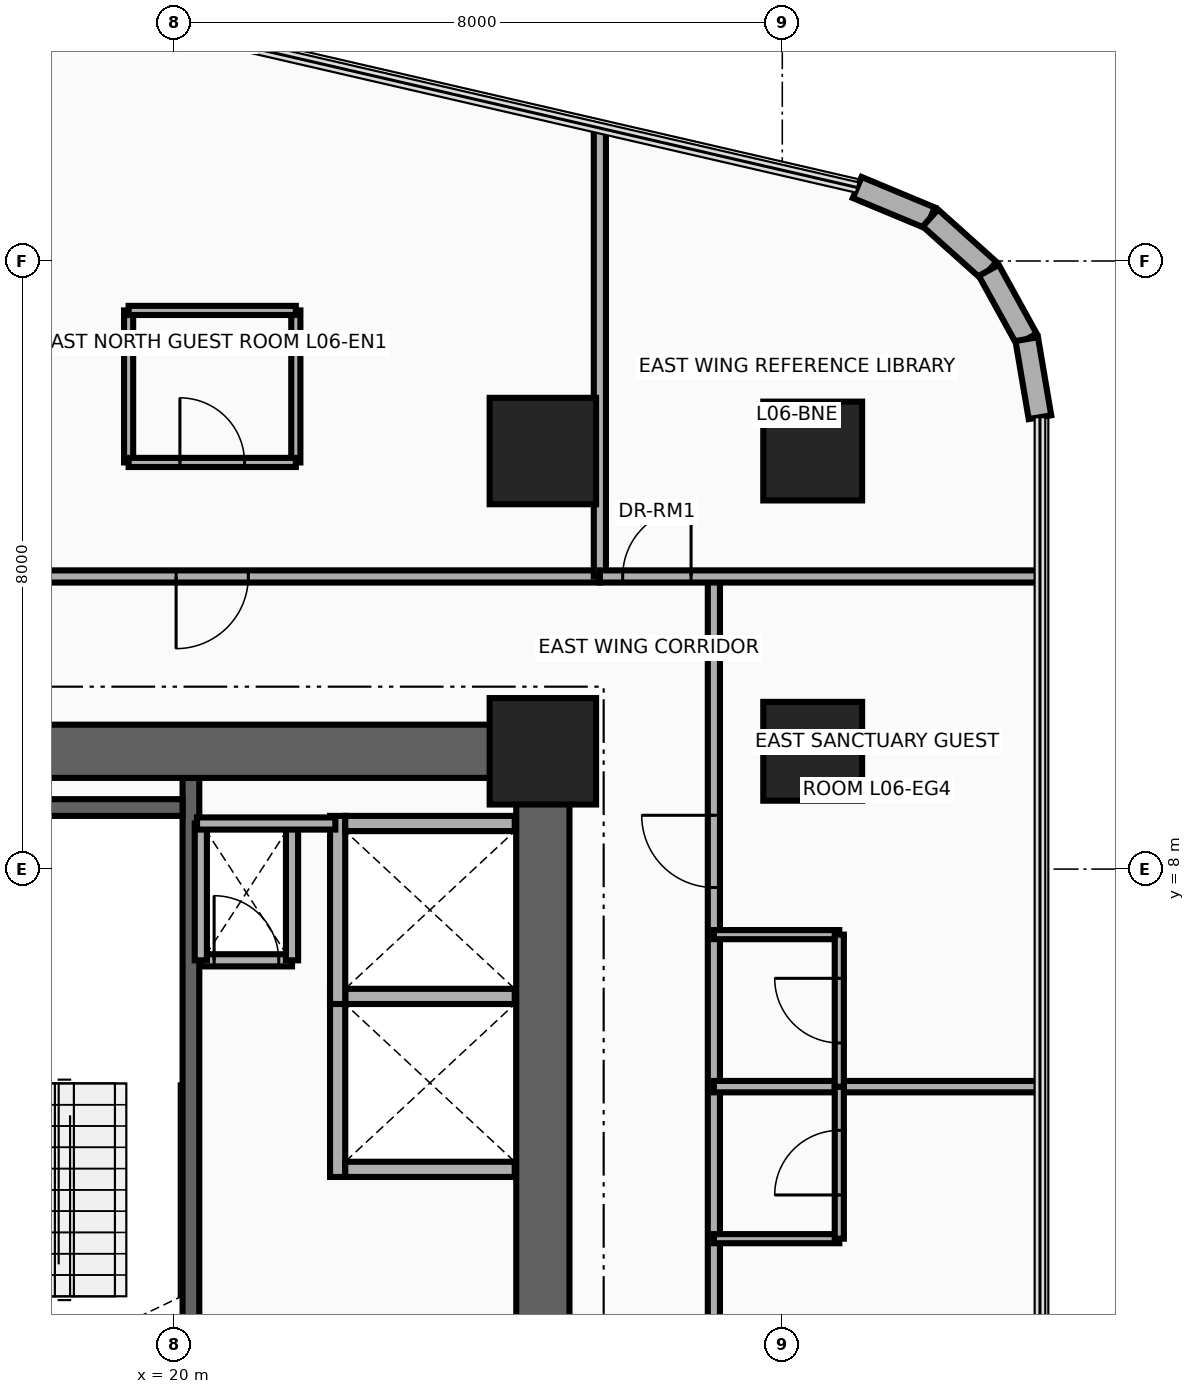
"""IFC4 building model, lengths in metres.
Left out: names, types, materials, properties, quantities, classifications, styles, units other than length and angle.
Written with IfcOpenShell. Run it as: python <this file> out.ifc"""

import sys

from ifc_helpers import new_model, si_unit, direction, frame, frame_2d, origin, origin_2d, place, context, subcontext, project, spatial, rectangle, circle, extrude, source, transform, mapped, element, fill, save


model = new_model("IFC4")
c1 = context("Model", 3, precision=1e-05, world=origin(), true_north=direction((0.0, 1.0)))
c2 = subcontext(c1, "Body", "Model", "MODEL_VIEW")
j1 = project(units=[si_unit("LENGTHUNIT", "METRE"), si_unit("PLANEANGLEUNIT", "RADIAN")], contexts=[c1])
p1 = place(None, origin())
s1 = spatial("IfcSite", under=j1, at=p1, CompositionType="ELEMENT")
p2 = place(p1, origin())
s2 = spatial("IfcBuilding", under=s1, at=p2, CompositionType="ELEMENT")
p3 = place(p2, frame((0.0, 0.0, 29.7)))
s3 = spatial("IfcBuildingStorey", under=s2, at=p3, CompositionType="ELEMENT", Elevation=29.7)
p4 = place(p3, frame((20.22, 0.68, 0.0), z_axis=(0.0, 0.0, 1.0), x_axis=(0.0, 1.0, 0.0)))
e1 = element("IfcWall", 1, at=p4, inside=s3, PredefinedType="SHEAR", context=c2, shape_type="SweptSolid", body=[
    extrude(rectangle(XDim=8.52, YDim=0.22, at=frame_2d((4.26, 0.0))), origin(), (0.0, 0.0, 1.0), 3.46),
])
p5 = place(p3, frame((17.0, 8.81, 0.0), z_axis=(0.0, 0.0, 1.0), x_axis=(1.0, 0.0, 0.0)))
e2 = element("IfcWall", 2, at=p5, inside=s3, PredefinedType="SHEAR", context=c2, shape_type="SweptSolid", body=[
    extrude(rectangle(XDim=3.11, YDim=0.22, at=frame_2d((1.555, 0.0))), origin(), (0.0, 0.0, 1.0), 3.46),
])
p6 = place(p3, frame((24.85, 0.95, 0.0), z_axis=(0.0, 0.0, 1.0), x_axis=(0.0, 1.0, 0.0)))
e3 = element("IfcWall", 3, at=p6, inside=s3, PredefinedType="SHEAR", context=c2, shape_type="SweptSolid", body=[
    extrude(rectangle(XDim=8.95, YDim=0.7, at=frame_2d((4.475, 0.0))), origin(), (0.0, 0.0, 1.0), 3.46),
])
p7 = place(p3, frame((15.85, 9.55, 0.0), z_axis=(0.0, 0.0, 1.0), x_axis=(1.0, 0.0, 0.0)))
e4 = element("IfcWall", 4, at=p7, inside=s3, PredefinedType="SHEAR", context=c2, shape_type="SweptSolid", body=[
    extrude(rectangle(XDim=9.0, YDim=0.7, at=frame_2d((4.5, 0.0))), origin(), (0.0, 0.0, 1.0), 3.46),
])
m1 = source(origin(), c2, "Body", "SweptSolid", [
    extrude(rectangle(XDim=1.4, YDim=1.4, at=origin_2d()), origin(), (0.0, 0.0, 1.0), 3.7),
])
p8 = place(p3, frame((24.85, 9.55, 0.0), z_axis=(0.0, 0.0, 1.0), x_axis=(1.0, 0.0, 0.0)))
e5 = element("IfcColumn", 5, at=p8, inside=s3, PredefinedType="COLUMN", context=c2, shape_type="MappedRepresentation", body=[
    mapped(m1, transform((0.0, 0.0, 0.0), x_axis=(1.0, 0.0, 0.0), y_axis=(0.0, 1.0, 0.0), z_axis=(0.0, 0.0, 1.0), scale=1.0)),
])
m2 = source(origin(), c2, "Body", "SweptSolid", [
    extrude(circle(Radius=0.65, at=origin_2d()), origin(), (0.0, 0.0, 1.0), 3.7),
])
p9 = place(p3, frame((28.4, 9.55, 0.0), z_axis=(0.0, 0.0, 1.0), x_axis=(1.0, 0.0, 0.0)))
e6 = element("IfcColumn", 6, at=p9, inside=s3, PredefinedType="COLUMN", context=c2, shape_type="MappedRepresentation", body=[
    mapped(m2, transform((0.0, 0.0, 0.0), x_axis=(1.0, 0.0, 0.0), y_axis=(0.0, 1.0, 0.0), z_axis=(0.0, 0.0, 1.0), scale=1.0)),
])
p10 = place(p3, frame((24.85, 13.5, 0.0), z_axis=(0.0, 0.0, 1.0), x_axis=(1.0, 0.0, 0.0)))
e7 = element("IfcColumn", 7, at=p10, inside=s3, PredefinedType="COLUMN", context=c2, shape_type="MappedRepresentation", body=[
    mapped(m1, transform((0.0, 0.0, 0.0), x_axis=(1.0, 0.0, 0.0), y_axis=(0.0, 1.0, 0.0), z_axis=(0.0, 0.0, 1.0), scale=1.0)),
])
p11 = place(p3, frame((28.4, 13.5, 0.0), z_axis=(0.0, 0.0, 1.0), x_axis=(1.0, 0.0, 0.0)))
e8 = element("IfcColumn", 8, at=p11, inside=s3, PredefinedType="COLUMN", context=c2, shape_type="MappedRepresentation", body=[
    mapped(m2, transform((0.0, 0.0, 0.0), x_axis=(1.0, 0.0, 0.0), y_axis=(0.0, 1.0, 0.0), z_axis=(0.0, 0.0, 1.0), scale=1.0)),
])
p12 = place(p3, frame((28.986, 16.967, 0.0), z_axis=(0.0, 0.0, 1.0), x_axis=(0.923083852684, -0.384598753136, 0.0)))
e9 = element("IfcWall", 9, at=p12, inside=s3, PredefinedType="SOLIDWALL", context=c2, shape_type="SweptSolid", body=[
    extrude(rectangle(XDim=1.042, YDim=0.3, at=frame_2d((0.521, 0.0))), origin(), (0.0, 0.0, 1.0), 3.46),
])
p13 = place(p3, frame((29.948, 16.566, 0.0), z_axis=(0.0, 0.0, 1.0), x_axis=(0.744585645533, -0.66752694063, 0.0)))
e10 = element("IfcWall", 10, at=p13, inside=s3, PredefinedType="SOLIDWALL", context=c2, shape_type="SweptSolid", body=[
    extrude(rectangle(XDim=1.033, YDim=0.3, at=frame_2d((0.517, 0.0))), origin(), (0.0, 0.0, 1.0), 3.46),
])
p14 = place(p3, frame((30.717, 15.877, 0.0), z_axis=(0.0, 0.0, 1.0), x_axis=(0.482971098131, -0.875636293429, 0.0)))
e11 = element("IfcWall", 11, at=p14, inside=s3, PredefinedType="SOLIDWALL", context=c2, shape_type="SweptSolid", body=[
    extrude(rectangle(XDim=1.033, YDim=0.3, at=frame_2d((0.516, 0.0))), origin(), (0.0, 0.0, 1.0), 3.46),
])
p15 = place(p3, frame((31.216, 14.973, 0.0), z_axis=(0.0, 0.0, 1.0), x_axis=(0.167019462117, -0.985953598946, 0.0)))
e12 = element("IfcWall", 12, at=p15, inside=s3, PredefinedType="SOLIDWALL", context=c2, shape_type="SweptSolid", body=[
    extrude(rectangle(XDim=1.042, YDim=0.3, at=frame_2d((0.521, 0.0))), origin(), (0.0, 0.0, 1.0), 3.46),
])
p16 = place(p3, frame((22.15, 3.95, 0.0), z_axis=(0.0, 0.0, 1.0), x_axis=(0.0, 1.0, 0.0)))
e13 = element("IfcWall", 13, at=p16, inside=s3, PredefinedType="MOVABLE", context=c2, shape_type="SweptSolid", body=[
    extrude(rectangle(XDim=2.475, YDim=0.2, at=frame_2d((1.238, 0.0))), origin(), (0.0, 0.0, 1.0), 3.46),
])
for number, where, z_axis, x_axis in (
    (14, (22.25, 4.05, 0.0), (0.0, 0.0, 1.0), (1.0, 0.0, 0.0)),
    (15, (22.25, 6.325, 0.0), (0.0, 0.0, 1.0), (1.0, 0.0, 0.0)),
):
    element("IfcWall", number, at=place(p3, frame(where, z_axis=z_axis, x_axis=x_axis)), inside=s3, PredefinedType="MOVABLE", context=c2, shape_type="SweptSolid", body=[
        extrude(rectangle(XDim=2.23, YDim=0.2, at=frame_2d((1.115, 0.0))), origin(), (0.0, 0.0, 1.0), 2.245),
    ])
p17 = place(p3, frame((22.15, 6.225, 0.0), z_axis=(0.0, 0.0, 1.0), x_axis=(0.0, 1.0, 0.0)))
e16 = element("IfcWall", 16, at=p17, inside=s3, PredefinedType="MOVABLE", context=c2, shape_type="SweptSolid", body=[
    extrude(rectangle(XDim=2.475, YDim=0.2, at=frame_2d((1.237, 0.0))), origin(), (0.0, 0.0, 1.0), 3.46),
])
p18 = place(p3, frame((22.25, 8.6, 0.0), z_axis=(0.0, 0.0, 1.0), x_axis=(1.0, 0.0, 0.0)))
e17 = element("IfcWall", 17, at=p18, inside=s3, PredefinedType="MOVABLE", context=c2, shape_type="SweptSolid", body=[
    extrude(rectangle(XDim=2.23, YDim=0.2, at=frame_2d((1.115, 0.0))), origin(), (0.0, 0.0, 1.0), 2.245),
])
p19 = place(p3, frame((20.35, 6.8, 0.0), z_axis=(0.0, 0.0, 1.0), x_axis=(1.0, 0.0, 0.0)))
e18 = element("IfcWall", 18, at=p19, inside=s3, PredefinedType="PARTITIONING", context=c2, shape_type="SweptSolid", body=[
    extrude(rectangle(XDim=1.2, YDim=0.16, at=frame_2d((0.6, 0.0))), origin(), (0.0, 0.0, 1.0), 3.46),
])
p20 = place(p19, frame((0.175, 0.0, 0.0)))
e19 = element("IfcOpeningElement", 19, at=p20, cuts=e18, PredefinedType="OPENING", context=c2, shape_type="SweptSolid", body=[
    extrude(rectangle(XDim=0.85, YDim=2.05, at=frame_2d((0.425, 1.025))), frame((0.0, 0.095, 0.0), z_axis=(0.0, -1.0, 0.0), x_axis=(1.0, 0.0, 0.0)), (0.0, 0.0, 1.0), 0.19),
])
for number, where, z_axis, x_axis in (
    (20, (21.55, 6.8, 0.0), (0.0, 0.0, 1.0), (0.0, 1.0, 0.0)),
    (21, (20.35, 6.8, 0.0), (0.0, 0.0, 1.0), (0.0, 1.0, 0.0)),
):
    element("IfcWall", number, at=place(p3, frame(where, z_axis=z_axis, x_axis=x_axis)), inside=s3, PredefinedType="PARTITIONING", context=c2, shape_type="SweptSolid", body=[
        extrude(rectangle(XDim=1.8, YDim=0.16, at=frame_2d((0.9, 0.0))), origin(), (0.0, 0.0, 1.0), 3.46),
    ])
p21 = place(p3, frame((20.3, 8.6, 0.0), z_axis=(0.0, 0.0, 1.0), x_axis=(1.0, 0.0, 0.0)))
e22 = element("IfcWall", 22, at=p21, inside=s3, PredefinedType="PARTITIONING", context=c2, shape_type="SweptSolid", body=[
    extrude(rectangle(XDim=1.82, YDim=0.16, at=frame_2d((0.91, 0.0))), origin(), (0.0, 0.0, 1.0), 3.46),
])
p22 = place(p3, frame((15.4, 11.85, 0.0), z_axis=(0.0, 0.0, 1.0), x_axis=(1.0, 0.0, 0.0)))
e23 = element("IfcWall", 23, at=p22, inside=s3, PredefinedType="PARTITIONING", context=c2, shape_type="SweptSolid", body=[
    extrude(rectangle(XDim=10.2, YDim=0.16, at=frame_2d((5.1, 0.0))), origin(), (0.0, 0.0, 1.0), 2.834),
])
p23 = place(p22, frame((4.625, 0.0, 0.0)))
e24 = element("IfcOpeningElement", 24, at=p23, cuts=e23, PredefinedType="OPENING", context=c2, shape_type="SweptSolid", body=[
    extrude(rectangle(XDim=0.95, YDim=2.15, at=frame_2d((0.475, 1.075))), frame((0.0, 0.095, 0.0), z_axis=(0.0, -1.0, 0.0), x_axis=(1.0, 0.0, 0.0)), (0.0, 0.0, 1.0), 0.19),
])
p24 = place(p3, frame((25.6, 11.85, 0.0), z_axis=(0.0, 0.0, 1.0), x_axis=(0.0, 1.0, 0.0)))
e25 = element("IfcWall", 25, at=p24, inside=s3, PredefinedType="PARTITIONING", context=c2, shape_type="SweptSolid", body=[
    extrude(rectangle(XDim=5.898, YDim=0.16, at=frame_2d((2.949, 0.0))), origin(), (0.0, 0.0, 1.0), 2.583),
])
for number, where, z_axis, x_axis in (
    (26, (19.4, 13.35, 0.0), (0.0, 0.0, 1.0), (0.0, 1.0, 0.0)),
    (27, (21.6, 13.35, 0.0), (0.0, 0.0, 1.0), (0.0, 1.0, 0.0)),
):
    element("IfcWall", number, at=place(p3, frame(where, z_axis=z_axis, x_axis=x_axis)), inside=s3, PredefinedType="PARTITIONING", context=c2, shape_type="SweptSolid", body=[
        extrude(rectangle(XDim=2.0, YDim=0.12, at=frame_2d((1.0, 0.0))), origin(), (0.0, 0.0, 1.0), 2.583),
    ])
p25 = place(p3, frame((19.4, 15.35, 0.0), z_axis=(0.0, 0.0, 1.0), x_axis=(1.0, 0.0, 0.0)))
e28 = element("IfcWall", 28, at=p25, inside=s3, PredefinedType="PARTITIONING", context=c2, shape_type="SweptSolid", body=[
    extrude(rectangle(XDim=2.2, YDim=0.12, at=frame_2d((1.1, 0.0))), origin(), (0.0, 0.0, 1.0), 3.46),
])
p26 = place(p3, frame((19.4, 13.35, 0.0), z_axis=(0.0, 0.0, 1.0), x_axis=(1.0, 0.0, 0.0)))
e29 = element("IfcWall", 29, at=p26, inside=s3, PredefinedType="PARTITIONING", context=c2, shape_type="SweptSolid", body=[
    extrude(rectangle(XDim=2.2, YDim=0.12, at=frame_2d((1.1, 0.0))), origin(), (0.0, 0.0, 1.0), 2.583),
])
p27 = place(p26, frame((0.675, 0.0, 0.0)))
e30 = element("IfcOpeningElement", 30, at=p27, cuts=e29, PredefinedType="OPENING", context=c2, shape_type="SweptSolid", body=[
    extrude(rectangle(XDim=0.85, YDim=2.1, at=frame_2d((0.425, 1.05))), frame((0.0, 0.075, 0.0), z_axis=(0.0, -1.0, 0.0), x_axis=(1.0, 0.0, 0.0)), (0.0, 0.0, 1.0), 0.15),
])
p28 = place(p3, frame((27.1, -13.89, 0.0), z_axis=(0.0, 0.0, 1.0), x_axis=(0.0, 1.0, 0.0)))
e31 = element("IfcWall", 31, at=p28, inside=s3, PredefinedType="PARTITIONING", context=c2, shape_type="SweptSolid", body=[
    extrude(rectangle(XDim=25.74, YDim=0.16, at=frame_2d((12.87, 0.0))), origin(), (0.0, 0.0, 1.0), 2.583),
])
p29 = place(p28, frame((2.62, 0.0, 0.0)))
e32 = element("IfcOpeningElement", 32, at=p29, cuts=e31, PredefinedType="OPENING", context=c2, shape_type="SweptSolid", body=[
    extrude(rectangle(XDim=0.95, YDim=2.15, at=frame_2d((0.475, 1.075))), frame((0.0, 0.095, 0.0), z_axis=(0.0, -1.0, 0.0), x_axis=(1.0, 0.0, 0.0)), (0.0, 0.0, 1.0), 0.19),
])
p30 = place(p28, frame((8.484, 0.0, 0.0)))
e33 = element("IfcOpeningElement", 33, at=p30, cuts=e31, PredefinedType="OPENING", context=c2, shape_type="SweptSolid", body=[
    extrude(rectangle(XDim=0.95, YDim=2.15, at=frame_2d((0.475, 1.075))), frame((0.0, 0.095, 0.0), z_axis=(0.0, -1.0, 0.0), x_axis=(1.0, 0.0, 0.0)), (0.0, 0.0, 1.0), 0.19),
])
p31 = place(p28, frame((14.197, 0.0, 0.0)))
e34 = element("IfcOpeningElement", 34, at=p31, cuts=e31, PredefinedType="OPENING", context=c2, shape_type="SweptSolid", body=[
    extrude(rectangle(XDim=0.95, YDim=2.15, at=frame_2d((0.475, 1.075))), frame((0.0, 0.095, 0.0), z_axis=(0.0, -1.0, 0.0), x_axis=(1.0, 0.0, 0.0)), (0.0, 0.0, 1.0), 0.19),
])
p32 = place(p28, frame((21.648, 0.0, 0.0)))
e35 = element("IfcOpeningElement", 35, at=p32, cuts=e31, PredefinedType="OPENING", context=c2, shape_type="SweptSolid", body=[
    extrude(rectangle(XDim=0.95, YDim=2.15, at=frame_2d((0.475, 1.075))), frame((0.0, 0.095, 0.0), z_axis=(0.0, -1.0, 0.0), x_axis=(1.0, 0.0, 0.0)), (0.0, 0.0, 1.0), 0.19),
])
p33 = place(p3, frame((25.6, 11.85, 0.0), z_axis=(0.0, 0.0, 1.0), x_axis=(1.0, 0.0, 0.0)))
e36 = element("IfcWall", 36, at=p33, inside=s3, PredefinedType="PARTITIONING", context=c2, shape_type="SweptSolid", body=[
    extrude(rectangle(XDim=5.79, YDim=0.16, at=frame_2d((2.895, 0.0))), origin(), (0.0, 0.0, 1.0), 2.896),
])
p34 = place(p33, frame((0.3, 0.0, 0.0)))
e37 = element("IfcOpeningElement", 37, at=p34, cuts=e36, PredefinedType="OPENING", context=c2, shape_type="SweptSolid", body=[
    extrude(rectangle(XDim=0.9, YDim=2.1, at=frame_2d((0.45, 1.05))), frame((0.0, 0.095, 0.0), z_axis=(0.0, -1.0, 0.0), x_axis=(1.0, 0.0, 0.0)), (0.0, 0.0, 1.0), 0.19),
])
p35 = place(p3, frame((27.1, 5.138, 0.0), z_axis=(0.0, 0.0, 1.0), x_axis=(1.0, 0.0, 0.0)))
e38 = element("IfcWall", 38, at=p35, inside=s3, PredefinedType="PARTITIONING", context=c2, shape_type="SweptSolid", body=[
    extrude(rectangle(XDim=4.29, YDim=0.15, at=frame_2d((2.145, 0.0))), origin(), (0.0, 0.0, 1.0), 2.896),
])
p36 = place(p3, frame((27.1, 3.138, 0.0), z_axis=(0.0, 0.0, 1.0), x_axis=(1.0, 0.0, 0.0)))
e39 = element("IfcWall", 39, at=p36, inside=s3, PredefinedType="PARTITIONING", context=c2, shape_type="SweptSolid", body=[
    extrude(rectangle(XDim=1.65, YDim=0.12, at=frame_2d((0.825, 0.0))), origin(), (0.0, 0.0, 1.0), 2.896),
])
p37 = place(p3, frame((28.75, 3.138, 0.0), z_axis=(0.0, 0.0, 1.0), x_axis=(0.0, 1.0, 0.0)))
e40 = element("IfcWall", 40, at=p37, inside=s3, PredefinedType="PARTITIONING", context=c2, shape_type="SweptSolid", body=[
    extrude(rectangle(XDim=2.0, YDim=0.12, at=frame_2d((1.0, 0.0))), origin(), (0.0, 0.0, 1.0), 3.46),
])
p38 = place(p37, frame((0.575, 0.0, 0.0)))
e41 = element("IfcOpeningElement", 41, at=p38, cuts=e40, PredefinedType="OPENING", context=c2, shape_type="SweptSolid", body=[
    extrude(rectangle(XDim=0.85, YDim=2.1, at=frame_2d((0.425, 1.05))), frame((0.0, 0.075, 0.0), z_axis=(0.0, -1.0, 0.0), x_axis=(1.0, 0.0, 0.0)), (0.0, 0.0, 1.0), 0.15),
])
p39 = place(p3, frame((27.1, 7.138, 0.0), z_axis=(0.0, 0.0, 1.0), x_axis=(1.0, 0.0, 0.0)))
e42 = element("IfcWall", 42, at=p39, inside=s3, PredefinedType="PARTITIONING", context=c2, shape_type="SweptSolid", body=[
    extrude(rectangle(XDim=1.65, YDim=0.12, at=frame_2d((0.825, 0.0))), origin(), (0.0, 0.0, 1.0), 2.896),
])
p40 = place(p3, frame((28.75, 5.138, 0.0), z_axis=(0.0, 0.0, 1.0), x_axis=(0.0, 1.0, 0.0)))
e43 = element("IfcWall", 43, at=p40, inside=s3, PredefinedType="PARTITIONING", context=c2, shape_type="SweptSolid", body=[
    extrude(rectangle(XDim=2.0, YDim=0.12, at=frame_2d((1.0, 0.0))), origin(), (0.0, 0.0, 1.0), 3.46),
])
p41 = place(p40, frame((0.575, 0.0, 0.0)))
e44 = element("IfcOpeningElement", 44, at=p41, cuts=e43, PredefinedType="OPENING", context=c2, shape_type="SweptSolid", body=[
    extrude(rectangle(XDim=0.85, YDim=2.1, at=frame_2d((0.425, 1.05))), frame((0.0, 0.075, 0.0), z_axis=(0.0, -1.0, 0.0), x_axis=(1.0, 0.0, 0.0)), (0.0, 0.0, 1.0), 0.15),
])
p42 = place(p20, origin())
e45 = element("IfcDoor", 45, at=p42, inside=s3, OperationType="SINGLE_SWING_LEFT", PredefinedType="DOOR", context=c2, shape_type="SweptSolid", body=[
    extrude(rectangle(XDim=0.85, YDim=2.05, at=frame_2d((0.425, 1.025))), frame((0.0, 0.025, 0.0), z_axis=(0.0, -1.0, 0.0), x_axis=(1.0, 0.0, 0.0)), (0.0, 0.0, 1.0), 0.05),
])
fill(e19, e45)
p43 = place(p23, frame((0.95, 0.0, 0.0), z_axis=(0.0, 0.0, 1.0), x_axis=(-1.0, 0.0, 0.0)))
e46 = element("IfcDoor", 46, at=p43, inside=s3, OperationType="SINGLE_SWING_LEFT", PredefinedType="DOOR", context=c2, shape_type="SweptSolid", body=[
    extrude(rectangle(XDim=0.95, YDim=2.15, at=frame_2d((0.475, 1.075))), frame((0.0, 0.025, 0.0), z_axis=(0.0, -1.0, 0.0), x_axis=(1.0, 0.0, 0.0)), (0.0, 0.0, 1.0), 0.05),
])
fill(e24, e46)
p44 = place(p27, origin())
e47 = element("IfcDoor", 47, at=p44, inside=s3, OperationType="SINGLE_SWING_RIGHT", PredefinedType="DOOR", context=c2, shape_type="SweptSolid", body=[
    extrude(rectangle(XDim=0.85, YDim=2.1, at=frame_2d((0.425, 1.05))), frame((0.0, 0.025, 0.0), z_axis=(0.0, -1.0, 0.0), x_axis=(1.0, 0.0, 0.0)), (0.0, 0.0, 1.0), 0.05),
])
fill(e30, e47)
p45 = place(p34, origin())
e48 = element("IfcDoor", 48, at=p45, inside=s3, OperationType="SINGLE_SWING_LEFT", PredefinedType="DOOR", context=c2, shape_type="SweptSolid", body=[
    extrude(rectangle(XDim=0.9, YDim=2.1, at=frame_2d((0.45, 1.05))), frame((0.0, 0.025, 0.0), z_axis=(0.0, -1.0, 0.0), x_axis=(1.0, 0.0, 0.0)), (0.0, 0.0, 1.0), 0.05),
])
fill(e37, e48)
p46 = place(p38, origin())
e49 = element("IfcDoor", 49, at=p46, inside=s3, OperationType="SINGLE_SWING_LEFT", PredefinedType="DOOR", context=c2, shape_type="SweptSolid", body=[
    extrude(rectangle(XDim=0.85, YDim=2.1, at=frame_2d((0.425, 1.05))), frame((0.0, 0.025, 0.0), z_axis=(0.0, -1.0, 0.0), x_axis=(1.0, 0.0, 0.0)), (0.0, 0.0, 1.0), 0.05),
])
fill(e41, e49)
p47 = place(p32, origin())
e50 = element("IfcDoor", 50, at=p47, inside=s3, OperationType="SINGLE_SWING_RIGHT", PredefinedType="DOOR", context=c2, shape_type="SweptSolid", body=[
    extrude(rectangle(XDim=0.95, YDim=2.15, at=frame_2d((0.475, 1.075))), frame((0.0, 0.025, 0.0), z_axis=(0.0, -1.0, 0.0), x_axis=(1.0, 0.0, 0.0)), (0.0, 0.0, 1.0), 0.05),
])
fill(e35, e50)
p48 = place(p41, origin())
e51 = element("IfcDoor", 51, at=p48, inside=s3, OperationType="SINGLE_SWING_LEFT", PredefinedType="DOOR", context=c2, shape_type="SweptSolid", body=[
    extrude(rectangle(XDim=0.85, YDim=2.1, at=frame_2d((0.425, 1.05))), frame((0.0, 0.025, 0.0), z_axis=(0.0, -1.0, 0.0), x_axis=(1.0, 0.0, 0.0)), (0.0, 0.0, 1.0), 0.05),
])
fill(e44, e51)
save(model, sys.argv[1])
